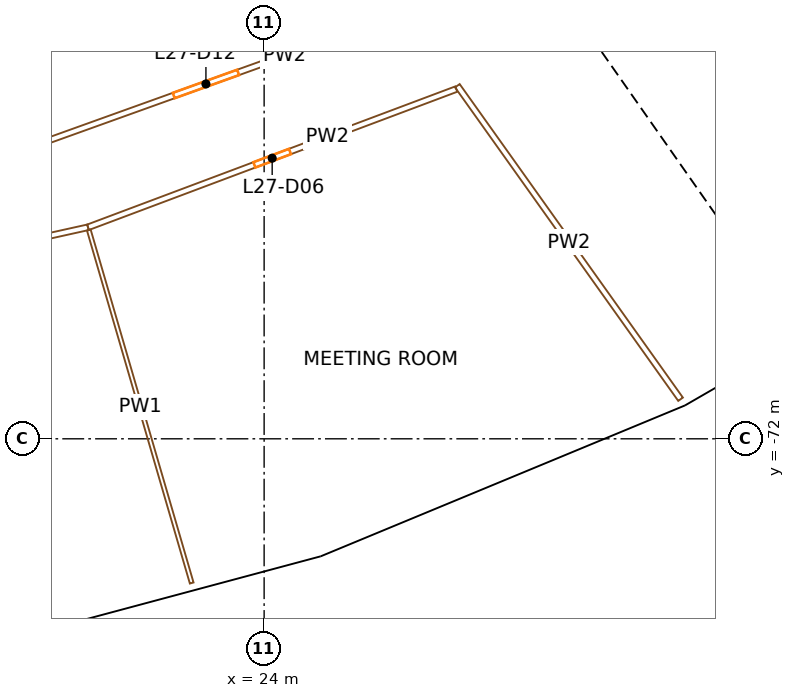
"""IFC4 building model, lengths in metres.
Left out: names, types, materials, properties, quantities, classifications, styles, units other than length and angle.
Written with IfcOpenShell. Run it as: python <this file> out.ifc"""

import sys

from ifc_helpers import new_model, si_unit, direction, frame, frame_2d, origin, origin_2d, place, context, subcontext, project, spatial, rectangle, extrude, element, fill, save


model = new_model("IFC4")
c1 = context("Model", 3, precision=1e-05, world=origin(), true_north=direction((0.0, 1.0)))
c2 = subcontext(c1, "Body", "Model", "MODEL_VIEW")
j1 = project(units=[si_unit("LENGTHUNIT", "METRE"), si_unit("PLANEANGLEUNIT", "RADIAN")], contexts=[c1])
p1 = place(None, origin())
s1 = spatial("IfcSite", under=j1, at=p1, CompositionType="ELEMENT")
p2 = place(p1, origin())
s2 = spatial("IfcBuilding", under=s1, at=p2, CompositionType="ELEMENT")
p3 = place(p2, frame((0.0, 0.0, 121.5)))
s3 = spatial("IfcBuildingStorey", under=s2, at=p3, CompositionType="ELEMENT", Elevation=121.5)
for number, where, z_axis, x_axis in (
    (1, (24.992, -73.624, 0.0), (0.0, 0.0, 1.0), (0.947, 0.321, 0.0)),
    (2, (34.388, -69.732, 0.0), (0.0, 0.0, 1.0), (0.897, 0.442, 0.0)),
):
    element("IfcColumn", number, at=place(p3, frame(where, z_axis=z_axis, x_axis=x_axis)), inside=s3, PredefinedType="COLUMN", context=c2, shape_type="SweptSolid", body=[
        extrude(rectangle(XDim=1.2, YDim=1.5, at=origin_2d()), origin(), (0.0, 0.0, 1.0), 3.8),
    ])
p4 = place(p3, frame((36.717, -66.337, 0.0), z_axis=(0.0, 0.0, 1.0), x_axis=(-0.573577477574, 0.819151315216, 0.0)))
e3 = element("IfcWall", 3, at=p4, inside=s3, PredefinedType="SHEAR", context=c2, shape_type="SweptSolid", body=[
    extrude(rectangle(XDim=14.8, YDim=0.9, at=frame_2d((7.4, 0.0))), origin(), (0.0, 0.0, 1.0), 3.5),
])
p5 = place(p4, frame((6.2, 0.0, 0.0)))
e4 = element("IfcOpeningElement", 4, at=p5, cuts=e3, PredefinedType="OPENING", context=c2, shape_type="SweptSolid", body=[
    extrude(rectangle(XDim=2.4, YDim=2.1, at=frame_2d((1.2, 1.05))), frame((0.0, 0.46, 0.0), z_axis=(0.0, -1.0, 0.0), x_axis=(1.0, 0.0, 0.0)), (0.0, 0.0, 1.0), 0.92),
])
p6 = place(p3, frame((35.221, -63.417, 0.0), z_axis=(0.0, 0.0, 1.0), x_axis=(0.819166993208, 0.573555086491, 0.0)))
e5 = element("IfcWall", 5, at=p6, inside=s3, PredefinedType="SOLIDWALL", context=c2, shape_type="SweptSolid", body=[
    extrude(rectangle(XDim=7.95, YDim=0.3, at=frame_2d((3.975, 0.0))), origin(), (0.0, 0.0, 1.0), 3.5),
])
p7 = place(p3, frame((10.537, -68.392, 0.0), z_axis=(0.0, 0.0, 1.0), x_axis=(0.97628985912, 0.216467343909, 0.0)))
e6 = element("IfcWall", 6, at=p7, inside=s3, PredefinedType="PARTITIONING", context=c2, shape_type="SweptSolid", body=[
    extrude(rectangle(XDim=9.043, YDim=0.15, at=frame_2d((4.521, 0.0))), origin(), (0.0, 0.0, 1.0), 2.4),
])
p8 = place(p3, frame((17.297, -64.521, 0.0), z_axis=(0.0, 0.0, 1.0), x_axis=(0.941151914592, 0.337983836389, 0.0)))
e7 = element("IfcWall", 7, at=p8, inside=s3, PredefinedType="PARTITIONING", context=c2, shape_type="SweptSolid", body=[
    extrude(rectangle(XDim=10.99, YDim=0.15, at=frame_2d((5.495, 0.0))), origin(), (0.0, 0.0, 1.0), 2.4),
])
p9 = place(p8, frame((4.595, 0.0, 0.0)))
e8 = element("IfcOpeningElement", 8, at=p9, cuts=e7, PredefinedType="OPENING", context=c2, shape_type="SweptSolid", body=[
    extrude(rectangle(XDim=1.8, YDim=2.1, at=frame_2d((0.9, 1.05))), frame((0.0, 0.085, 0.0), z_axis=(0.0, -1.0, 0.0), x_axis=(1.0, 0.0, 0.0)), (0.0, 0.0, 1.0), 0.17),
])
p10 = place(p3, frame((29.057, -62.798, 0.0), z_axis=(0.0, 0.0, 1.0), x_axis=(-0.936236096431, -0.351371557956, 0.0)))
e9 = element("IfcWall", 9, at=p10, inside=s3, PredefinedType="PARTITIONING", context=c2, shape_type="SweptSolid", body=[
    extrude(rectangle(XDim=10.352, YDim=0.15, at=frame_2d((5.176, 0.0))), origin(), (0.0, 0.0, 1.0), 2.4),
])
p11 = place(p10, frame((4.676, 0.0, 0.0)))
e10 = element("IfcOpeningElement", 10, at=p11, cuts=e9, PredefinedType="OPENING", context=c2, shape_type="SweptSolid", body=[
    extrude(rectangle(XDim=1.0, YDim=2.1, at=frame_2d((0.5, 1.05))), frame((0.0, 0.085, 0.0), z_axis=(0.0, -1.0, 0.0), x_axis=(1.0, 0.0, 0.0)), (0.0, 0.0, 1.0), 0.17),
])
p12 = place(p3, frame((22.094, -75.794, 0.0), z_axis=(0.0, 0.0, 1.0), x_axis=(-0.279846881911, 0.960044646194, 0.0)))
e11 = element("IfcWall", 11, at=p12, inside=s3, PredefinedType="PARTITIONING", context=c2, shape_type="SweptSolid", body=[
    extrude(rectangle(XDim=9.674, YDim=0.1, at=frame_2d((4.837, 0.0))), origin(), (0.0, 0.0, 1.0), 2.4),
])
p13 = place(p3, frame((29.084, -62.71, 0.0), z_axis=(0.0, 0.0, 1.0), x_axis=(0.580031092611, -0.814594335608, 0.0)))
e12 = element("IfcWall", 12, at=p13, inside=s3, PredefinedType="PARTITIONING", context=c2, shape_type="SweptSolid", body=[
    extrude(rectangle(XDim=10.126, YDim=0.15, at=frame_2d((5.063, 0.0))), origin(), (0.0, 0.0, 1.0), 2.4),
])
p14 = place(p11, origin())
e13 = element("IfcDoor", 13, at=p14, inside=s3, OperationType="SINGLE_SWING_RIGHT", PredefinedType="DOOR", context=c2, shape_type="SweptSolid", body=[
    extrude(rectangle(XDim=1.0, YDim=2.1, at=frame_2d((0.5, 1.05))), frame((0.0, 0.025, 0.0), z_axis=(0.0, -1.0, 0.0), x_axis=(1.0, 0.0, 0.0)), (0.0, 0.0, 1.0), 0.05),
])
fill(e10, e13)
p15 = place(p9, origin())
e14 = element("IfcDoor", 14, at=p15, inside=s3, OperationType="DOUBLE_DOOR_SINGLE_SWING", PredefinedType="DOOR", context=c2, shape_type="SweptSolid", body=[
    extrude(rectangle(XDim=1.8, YDim=2.1, at=frame_2d((0.9, 1.05))), frame((0.0, 0.025, 0.0), z_axis=(0.0, -1.0, 0.0), x_axis=(1.0, 0.0, 0.0)), (0.0, 0.0, 1.0), 0.05),
])
fill(e8, e14)
save(model, sys.argv[1])
